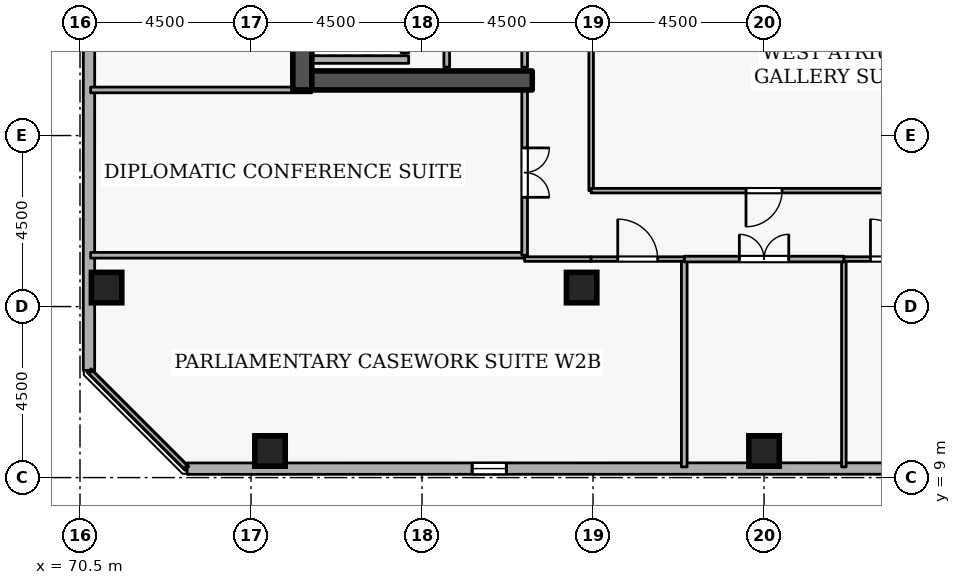
"""IFC4 building model, lengths in metres.
Left out: names, types, materials, properties, quantities, classifications, styles, units other than length and angle.
Written with IfcOpenShell. Run it as: python <this file> out.ifc"""

import sys

from ifc_helpers import new_model, si_unit, direction, frame, frame_2d, origin, origin_2d, place, context, subcontext, project, spatial, rectangle, extrude, element, fill, save


model = new_model("IFC4")
c1 = context("Model", 3, precision=1e-05, world=origin(), true_north=direction((0.0, 1.0)))
c2 = subcontext(c1, "Body", "Model", "MODEL_VIEW")
j1 = project(units=[si_unit("LENGTHUNIT", "METRE"), si_unit("PLANEANGLEUNIT", "RADIAN")], contexts=[c1])
p1 = place(None, origin())
s1 = spatial("IfcSite", under=j1, at=p1, CompositionType="ELEMENT")
p2 = place(p1, origin())
s2 = spatial("IfcBuilding", under=s1, at=p2, CompositionType="ELEMENT")
p3 = place(p2, frame((0.0, 0.0, 258.3)))
s3 = spatial("IfcBuildingStorey", under=s2, at=p3, CompositionType="ELEMENT", Elevation=258.3)
p4 = place(p3, frame((76.35, 19.2, 0.0), z_axis=(0.0, 0.0, 1.0), x_axis=(0.0, 1.0, 0.0)))
e1 = element("IfcWall", 1, at=p4, inside=s3, PredefinedType="SHEAR", context=c2, shape_type="SweptSolid", body=[
    extrude(rectangle(XDim=15.6, YDim=0.5, at=frame_2d((7.8, 0.0))), origin(), (0.0, 0.0, 1.0), 3.6),
])
p5 = place(p3, frame((76.6, 19.45, 0.0), z_axis=(0.0, 0.0, 1.0), x_axis=(1.0, 0.0, 0.0)))
e2 = element("IfcWall", 2, at=p5, inside=s3, PredefinedType="SHEAR", context=c2, shape_type="SweptSolid", body=[
    extrude(rectangle(XDim=5.8, YDim=0.5, at=frame_2d((2.9, 0.0))), origin(), (0.0, 0.0, 1.0), 3.6),
])
for number, where, z_axis, x_axis in (
    (3, (71.2, 14.0, 0.0), (0.0, 0.0, 1.0), (1.0, 0.0, 0.0)),
    (4, (88.5, 9.7, 0.0), (0.0, 0.0, 1.0), (1.0, 0.0, 0.0)),
    (5, (75.5, 9.7, 0.0), (0.0, 0.0, 1.0), (1.0, 0.0, 0.0)),
    (6, (83.7, 14.0, 0.0), (0.0, 0.0, 1.0), (1.0, 0.0, 0.0)),
):
    element("IfcColumn", number, at=place(p3, frame(where, z_axis=z_axis, x_axis=x_axis)), inside=s3, PredefinedType="COLUMN", context=c2, shape_type="SweptSolid", body=[
        extrude(rectangle(XDim=0.8, YDim=0.8, at=origin_2d()), origin(), (0.0, 0.0, 1.0), 3.6),
    ])
p6 = place(p3, frame((73.319, 9.235, 0.0), z_axis=(0.0, 0.0, 1.0), x_axis=(0.999999991209, 0.000132597301, 0.0)))
e7 = element("IfcWall", 7, at=p6, inside=s3, PredefinedType="STANDARD", context=c2, shape_type="SweptSolid", body=[
    extrude(rectangle(XDim=34.983, YDim=0.3, at=frame_2d((17.492, 0.0))), origin(), (0.0, 0.0, 1.0), 2.7),
])
p7 = place(p6, frame((7.5, 0.0, 0.72)))
e8 = element("IfcOpeningElement", 8, at=p7, cuts=e7, PredefinedType="OPENING", context=c2, shape_type="SweptSolid", body=[
    extrude(rectangle(XDim=0.9, YDim=1.75, at=frame_2d((0.45, 0.875))), frame((0.0, 0.16, 0.0), z_axis=(0.0, -1.0, 0.0), x_axis=(1.0, 0.0, 0.0)), (0.0, 0.0, 1.0), 0.32),
])
p8 = place(p6, frame((21.9, 0.0, 0.72)))
e9 = element("IfcOpeningElement", 9, at=p8, cuts=e7, PredefinedType="OPENING", context=c2, shape_type="SweptSolid", body=[
    extrude(rectangle(XDim=0.9, YDim=1.75, at=frame_2d((0.45, 0.875))), frame((0.0, 0.16, 0.0), z_axis=(0.0, -1.0, 0.0), x_axis=(1.0, 0.0, 0.0)), (0.0, 0.0, 1.0), 0.32),
])
p9 = place(p6, frame((31.5, 0.0, 0.72)))
e10 = element("IfcOpeningElement", 10, at=p9, cuts=e7, PredefinedType="OPENING", context=c2, shape_type="SweptSolid", body=[
    extrude(rectangle(XDim=0.9, YDim=1.75, at=frame_2d((0.45, 0.875))), frame((0.0, 0.16, 0.0), z_axis=(0.0, -1.0, 0.0), x_axis=(1.0, 0.0, 0.0)), (0.0, 0.0, 1.0), 0.32),
])
p10 = place(p3, frame((70.74, 46.802, 0.0), z_axis=(0.0, 0.0, 1.0), x_axis=(-0.000132597301, -0.999999991209, 0.0)))
e11 = element("IfcWall", 11, at=p10, inside=s3, PredefinedType="STANDARD", context=c2, shape_type="SweptSolid", body=[
    extrude(rectangle(XDim=34.983, YDim=0.3, at=frame_2d((17.492, 0.0))), origin(), (0.0, 0.0, 1.0), 2.7),
])
p11 = place(p10, frame((2.7, 0.0, 0.72)))
e12 = element("IfcOpeningElement", 12, at=p11, cuts=e11, PredefinedType="OPENING", context=c2, shape_type="SweptSolid", body=[
    extrude(rectangle(XDim=0.9, YDim=1.75, at=frame_2d((0.45, 0.875))), frame((0.0, 0.16, 0.0), z_axis=(0.0, -1.0, 0.0), x_axis=(1.0, 0.0, 0.0)), (0.0, 0.0, 1.0), 0.32),
])
p12 = place(p10, frame((12.3, 0.0, 0.72)))
e13 = element("IfcOpeningElement", 13, at=p12, cuts=e11, PredefinedType="OPENING", context=c2, shape_type="SweptSolid", body=[
    extrude(rectangle(XDim=0.9, YDim=1.75, at=frame_2d((0.45, 0.875))), frame((0.0, 0.16, 0.0), z_axis=(0.0, -1.0, 0.0), x_axis=(1.0, 0.0, 0.0)), (0.0, 0.0, 1.0), 0.32),
])
p13 = place(p10, frame((17.1, 0.0, 0.72)))
e14 = element("IfcOpeningElement", 14, at=p13, cuts=e11, PredefinedType="OPENING", context=c2, shape_type="SweptSolid", body=[
    extrude(rectangle(XDim=0.9, YDim=1.75, at=frame_2d((0.45, 0.875))), frame((0.0, 0.16, 0.0), z_axis=(0.0, -1.0, 0.0), x_axis=(1.0, 0.0, 0.0)), (0.0, 0.0, 1.0), 0.32),
])
p14 = place(p10, frame((21.9, 0.0, 0.72)))
e15 = element("IfcOpeningElement", 15, at=p14, cuts=e11, PredefinedType="OPENING", context=c2, shape_type="SweptSolid", body=[
    extrude(rectangle(XDim=0.9, YDim=1.75, at=frame_2d((0.45, 0.875))), frame((0.0, 0.16, 0.0), z_axis=(0.0, -1.0, 0.0), x_axis=(1.0, 0.0, 0.0)), (0.0, 0.0, 1.0), 0.32),
])
p15 = place(p3, frame((79.05, 20.18, 0.0), z_axis=(0.0, 0.0, 1.0), x_axis=(0.0, 1.0, 0.0)))
e16 = element("IfcWall", 16, at=p15, inside=s3, PredefinedType="STANDARD", context=c2, shape_type="SweptSolid", body=[
    extrude(rectangle(XDim=1.94, YDim=0.2, at=frame_2d((0.97, 0.0))), origin(), (0.0, 0.0, 1.0), 3.34),
])
p16 = place(p15, frame((0.46, 0.0, 0.0)))
e17 = element("IfcOpeningElement", 17, at=p16, cuts=e16, PredefinedType="OPENING", context=c2, shape_type="SweptSolid", body=[
    extrude(rectangle(XDim=1.02, YDim=2.06, at=frame_2d((0.51, 1.03))), frame((0.0, 0.11, 0.0), z_axis=(0.0, -1.0, 0.0), x_axis=(1.0, 0.0, 0.0)), (0.0, 0.0, 1.0), 0.22),
])
p17 = place(p3, frame((76.612, 20.0, 0.0), z_axis=(0.0, 0.0, 1.0), x_axis=(1.0, 0.0, 0.0)))
e18 = element("IfcWall", 18, at=p17, inside=s3, PredefinedType="STANDARD", context=c2, shape_type="SweptSolid", body=[
    extrude(rectangle(XDim=2.536, YDim=0.2, at=frame_2d((1.268, 0.0))), origin(), (0.0, 0.0, 1.0), 3.34),
])
p18 = place(p3, frame((82.2, 19.8, 0.0), z_axis=(0.0, 0.0, 1.0), x_axis=(0.0, 1.0, 0.0)))
e19 = element("IfcWall", 19, at=p18, inside=s3, PredefinedType="PARTITIONING", context=c2, shape_type="SweptSolid", body=[
    extrude(rectangle(XDim=2.25, YDim=0.15, at=frame_2d((1.125, 0.0))), origin(), (0.0, 0.0, 1.0), 3.34),
])
p19 = place(p18, frame((0.665, 0.0, 0.0)))
e20 = element("IfcOpeningElement", 20, at=p19, cuts=e19, PredefinedType="OPENING", context=c2, shape_type="SweptSolid", body=[
    extrude(rectangle(XDim=0.92, YDim=2.08, at=frame_2d((0.46, 1.04))), frame((0.0, 0.085, 0.0), z_axis=(0.0, -1.0, 0.0), x_axis=(1.0, 0.0, 0.0)), (0.0, 0.0, 1.0), 0.17),
])
p20 = place(p3, frame((80.15, 22.05, 0.0), z_axis=(0.0, 0.0, 1.0), x_axis=(0.0, -1.0, 0.0)))
e21 = element("IfcWall", 21, at=p20, inside=s3, PredefinedType="PARTITIONING", context=c2, shape_type="SweptSolid", body=[
    extrude(rectangle(XDim=2.25, YDim=0.15, at=frame_2d((1.125, 0.0))), origin(), (0.0, 0.0, 1.0), 3.34),
])
p21 = place(p3, frame((82.2, 14.85, 0.0), z_axis=(0.0, 0.0, 1.0), x_axis=(-1.0, 0.0, 0.0)))
e22 = element("IfcWall", 22, at=p21, inside=s3, PredefinedType="PARTITIONING", context=c2, shape_type="SweptSolid", body=[
    extrude(rectangle(XDim=11.42, YDim=0.15, at=frame_2d((5.71, 0.0))), origin(), (0.0, 0.0, 1.0), 3.34),
])
p22 = place(p3, frame((70.78, 19.2, 0.0), z_axis=(0.0, 0.0, 1.0), x_axis=(1.0, 0.0, 0.0)))
e23 = element("IfcWall", 23, at=p22, inside=s3, PredefinedType="PARTITIONING", context=c2, shape_type="SweptSolid", body=[
    extrude(rectangle(XDim=5.82, YDim=0.15, at=frame_2d((2.91, 0.0))), origin(), (0.0, 0.0, 1.0), 2.545),
])
p23 = place(p3, frame((82.2, 19.2, 0.0), z_axis=(0.0, 0.0, 1.0), x_axis=(0.0, -1.0, 0.0)))
e24 = element("IfcWall", 24, at=p23, inside=s3, PredefinedType="PARTITIONING", context=c2, shape_type="SweptSolid", body=[
    extrude(rectangle(XDim=4.35, YDim=0.15, at=frame_2d((2.175, 0.0))), origin(), (0.0, 0.0, 1.0), 3.34),
])
p24 = place(p23, frame((1.525, 0.0, 0.0)))
e25 = element("IfcOpeningElement", 25, at=p24, cuts=e24, PredefinedType="OPENING", context=c2, shape_type="SweptSolid", body=[
    extrude(rectangle(XDim=1.3, YDim=2.12, at=frame_2d((0.65, 1.06))), frame((0.0, 0.085, 0.0), z_axis=(0.0, -1.0, 0.0), x_axis=(1.0, 0.0, 0.0)), (0.0, 0.0, 1.0), 0.17),
])
p25 = place(p3, frame((90.6, 9.28, 0.0), z_axis=(0.0, 0.0, 1.0), x_axis=(0.0, 1.0, 0.0)))
e26 = element("IfcWall", 26, at=p25, inside=s3, PredefinedType="PARTITIONING", context=c2, shape_type="SweptSolid", body=[
    extrude(rectangle(XDim=5.47, YDim=0.12, at=frame_2d((2.735, 0.0))), origin(), (0.0, 0.0, 1.0), 3.34),
])
p26 = place(p3, frame((90.6, 14.75, 0.0), z_axis=(0.0, 0.0, 1.0), x_axis=(1.0, 0.0, 0.0)))
e27 = element("IfcWall", 27, at=p26, inside=s3, PredefinedType="PARTITIONING", context=c2, shape_type="SweptSolid", body=[
    extrude(rectangle(XDim=2.45, YDim=0.12, at=frame_2d((1.225, 0.0))), origin(), (0.0, 0.0, 1.0), 3.34),
])
p27 = place(p26, frame((0.7, 0.0, 0.0)))
e28 = element("IfcOpeningElement", 28, at=p27, cuts=e27, PredefinedType="OPENING", context=c2, shape_type="SweptSolid", body=[
    extrude(rectangle(XDim=1.05, YDim=2.1, at=frame_2d((0.525, 1.05))), frame((0.0, 0.07, 0.0), z_axis=(0.0, -1.0, 0.0), x_axis=(1.0, 0.0, 0.0)), (0.0, 0.0, 1.0), 0.14),
])
p28 = place(p3, frame((86.4, 9.28, 0.0), z_axis=(0.0, 0.0, 1.0), x_axis=(0.0, 1.0, 0.0)))
e29 = element("IfcWall", 29, at=p28, inside=s3, PredefinedType="PARTITIONING", context=c2, shape_type="SweptSolid", body=[
    extrude(rectangle(XDim=5.47, YDim=0.15, at=frame_2d((2.735, 0.0))), origin(), (0.0, 0.0, 1.0), 3.34),
])
p29 = place(p3, frame((86.4, 14.75, 0.0), z_axis=(0.0, 0.0, 1.0), x_axis=(1.0, 0.0, 0.0)))
e30 = element("IfcWall", 30, at=p29, inside=s3, PredefinedType="PARTITIONING", context=c2, shape_type="SweptSolid", body=[
    extrude(rectangle(XDim=4.2, YDim=0.15, at=frame_2d((2.1, 0.0))), origin(), (0.0, 0.0, 1.0), 3.34),
])
p30 = place(p29, frame((1.45, 0.0, 0.0)))
e31 = element("IfcOpeningElement", 31, at=p30, cuts=e30, PredefinedType="OPENING", context=c2, shape_type="SweptSolid", body=[
    extrude(rectangle(XDim=1.3, YDim=2.12, at=frame_2d((0.65, 1.06))), frame((0.0, 0.085, 0.0), z_axis=(0.0, -1.0, 0.0), x_axis=(1.0, 0.0, 0.0)), (0.0, 0.0, 1.0), 0.17),
])
p31 = place(p3, frame((73.275, 9.28, 0.0), z_axis=(0.0, 0.0, 1.0), x_axis=(-0.707106781187, 0.707106781187, 0.0)))
e32 = element("IfcWall", 32, at=p31, inside=s3, PredefinedType="PARTITIONING", context=c2, shape_type="SweptSolid", body=[
    extrude(rectangle(XDim=3.528, YDim=0.12, at=frame_2d((1.764, 0.0))), origin(), (0.0, 0.0, 1.0), 3.34),
])
p32 = place(p3, frame((82.2, 14.75, 0.0), z_axis=(0.0, 0.0, 1.0), x_axis=(1.0, 0.0, 0.0)))
e33 = element("IfcWall", 33, at=p32, inside=s3, PredefinedType="PARTITIONING", context=c2, shape_type="SweptSolid", body=[
    extrude(rectangle(XDim=1.75, YDim=0.12, at=frame_2d((0.875, 0.0))), origin(), (0.0, 0.0, 1.0), 3.34),
])
p33 = place(p3, frame((83.95, 14.75, 0.0), z_axis=(0.0, 0.0, 1.0), x_axis=(1.0, 0.0, 0.0)))
e34 = element("IfcWall", 34, at=p33, inside=s3, PredefinedType="PARTITIONING", context=c2, shape_type="SweptSolid", body=[
    extrude(rectangle(XDim=2.45, YDim=0.12, at=frame_2d((1.225, 0.0))), origin(), (0.0, 0.0, 1.0), 3.34),
])
p34 = place(p33, frame((0.7, 0.0, 0.0)))
e35 = element("IfcOpeningElement", 35, at=p34, cuts=e34, PredefinedType="OPENING", context=c2, shape_type="SweptSolid", body=[
    extrude(rectangle(XDim=1.05, YDim=2.1, at=frame_2d((0.525, 1.05))), frame((0.0, 0.07, 0.0), z_axis=(0.0, -1.0, 0.0), x_axis=(1.0, 0.0, 0.0)), (0.0, 0.0, 1.0), 0.14),
])
p35 = place(p3, frame((83.95, 16.55, 0.0), z_axis=(0.0, 0.0, 1.0), x_axis=(0.0, 1.0, 0.0)))
e36 = element("IfcWall", 36, at=p35, inside=s3, PredefinedType="PARTITIONING", context=c2, shape_type="SweptSolid", body=[
    extrude(rectangle(XDim=5.85, YDim=0.12, at=frame_2d((2.925, 0.0))), origin(), (0.0, 0.0, 1.0), 3.34),
])
p36 = place(p3, frame((93.05, 16.55, 0.0), z_axis=(0.0, 0.0, 1.0), x_axis=(-1.0, 0.0, 0.0)))
e37 = element("IfcWall", 37, at=p36, inside=s3, PredefinedType="PARTITIONING", context=c2, shape_type="SweptSolid", body=[
    extrude(rectangle(XDim=9.1, YDim=0.12, at=frame_2d((4.55, 0.0))), origin(), (0.0, 0.0, 1.0), 3.34),
])
p37 = place(p36, frame((4.075, 0.0, 0.0)))
e38 = element("IfcOpeningElement", 38, at=p37, cuts=e37, PredefinedType="OPENING", context=c2, shape_type="SweptSolid", body=[
    extrude(rectangle(XDim=0.95, YDim=2.1, at=frame_2d((0.475, 1.05))), frame((0.0, 0.07, 0.0), z_axis=(0.0, -1.0, 0.0), x_axis=(1.0, 0.0, 0.0)), (0.0, 0.0, 1.0), 0.14),
])
p38 = place(p7, origin())
e39 = element("IfcWindow", 39, at=p38, inside=s3, PartitioningType="SINGLE_PANEL", PredefinedType="WINDOW", context=c2, shape_type="SweptSolid", body=[
    extrude(rectangle(XDim=0.9, YDim=1.75, at=frame_2d((0.45, 0.875))), frame((0.0, 0.03, 0.0), z_axis=(0.0, -1.0, 0.0), x_axis=(1.0, 0.0, 0.0)), (0.0, 0.0, 1.0), 0.06),
])
fill(e8, e39)
p39 = place(p24, origin())
e40 = element("IfcDoor", 40, at=p39, inside=s3, OperationType="DOUBLE_DOOR_SINGLE_SWING", PredefinedType="DOOR", context=c2, shape_type="SweptSolid", body=[
    extrude(rectangle(XDim=1.3, YDim=2.12, at=frame_2d((0.65, 1.06))), frame((0.0, 0.025, 0.0), z_axis=(0.0, -1.0, 0.0), x_axis=(1.0, 0.0, 0.0)), (0.0, 0.0, 1.0), 0.05),
])
fill(e25, e40)
p40 = place(p27, origin())
e41 = element("IfcDoor", 41, at=p40, inside=s3, OperationType="SINGLE_SWING_LEFT", PredefinedType="DOOR", context=c2, shape_type="SweptSolid", body=[
    extrude(rectangle(XDim=1.05, YDim=2.1, at=frame_2d((0.525, 1.05))), frame((0.0, 0.025, 0.0), z_axis=(0.0, -1.0, 0.0), x_axis=(1.0, 0.0, 0.0)), (0.0, 0.0, 1.0), 0.05),
])
fill(e28, e41)
p41 = place(p30, origin())
e42 = element("IfcDoor", 42, at=p41, inside=s3, OperationType="DOUBLE_DOOR_SINGLE_SWING", PredefinedType="DOOR", context=c2, shape_type="SweptSolid", body=[
    extrude(rectangle(XDim=1.3, YDim=2.12, at=frame_2d((0.65, 1.06))), frame((0.0, 0.025, 0.0), z_axis=(0.0, -1.0, 0.0), x_axis=(1.0, 0.0, 0.0)), (0.0, 0.0, 1.0), 0.05),
])
fill(e31, e42)
p42 = place(p34, origin())
e43 = element("IfcDoor", 43, at=p42, inside=s3, OperationType="SINGLE_SWING_LEFT", PredefinedType="DOOR", context=c2, shape_type="SweptSolid", body=[
    extrude(rectangle(XDim=1.05, YDim=2.1, at=frame_2d((0.525, 1.05))), frame((0.0, 0.025, 0.0), z_axis=(0.0, -1.0, 0.0), x_axis=(1.0, 0.0, 0.0)), (0.0, 0.0, 1.0), 0.05),
])
fill(e35, e43)
p43 = place(p37, origin())
e44 = element("IfcDoor", 44, at=p43, inside=s3, OperationType="SINGLE_SWING_RIGHT", PredefinedType="DOOR", context=c2, shape_type="SweptSolid", body=[
    extrude(rectangle(XDim=0.95, YDim=2.1, at=frame_2d((0.475, 1.05))), frame((0.0, 0.025, 0.0), z_axis=(0.0, -1.0, 0.0), x_axis=(1.0, 0.0, 0.0)), (0.0, 0.0, 1.0), 0.05),
])
fill(e38, e44)
save(model, sys.argv[1])
